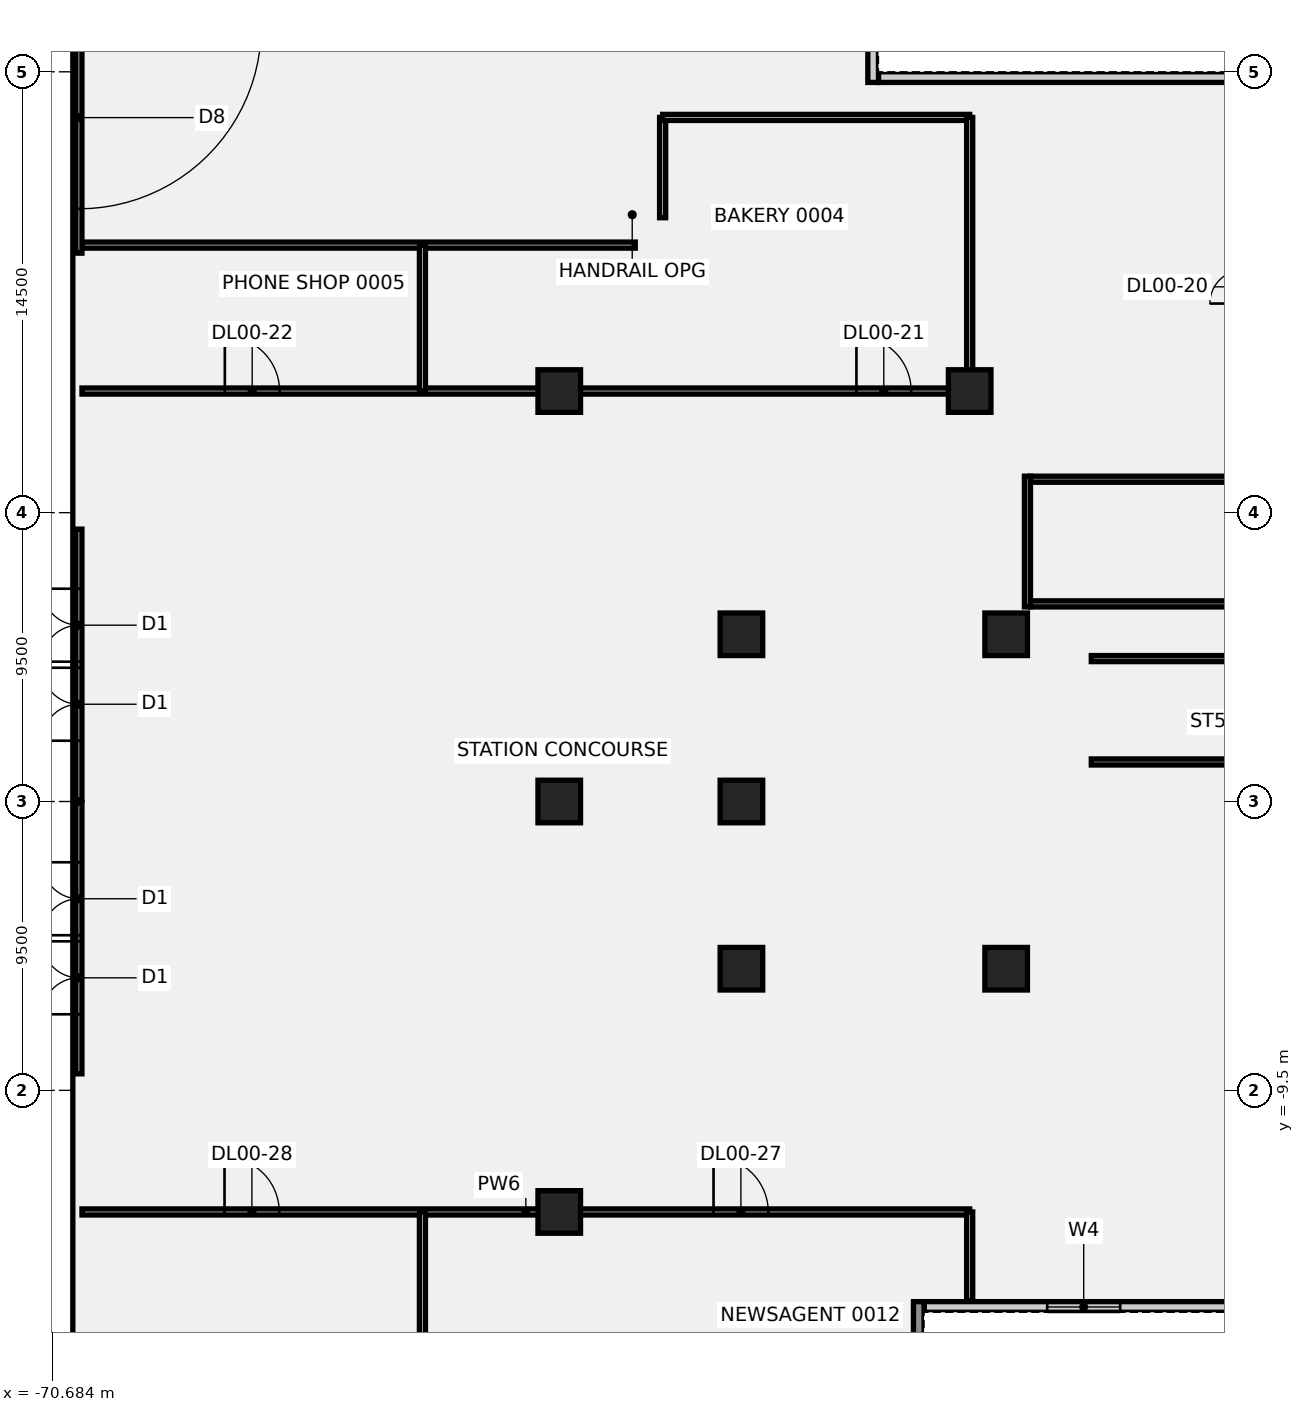
"""IFC4 building model, lengths in metres.
Left out: names, types, materials, properties, quantities, classifications, styles, units other than length and angle.
Written with IfcOpenShell. Run it as: python <this file> out.ifc"""

import sys

from ifc_helpers import new_model, si_unit, direction, frame, frame_2d, origin, origin_2d, place, context, subcontext, project, spatial, polyline, rectangle, outline, extrude, element, fill, save


model = new_model("IFC4")
c1 = context("Model", 3, precision=1e-05, world=origin(), true_north=direction((0.0, 1.0)))
c2 = subcontext(c1, "Body", "Model", "MODEL_VIEW")
j1 = project(units=[si_unit("LENGTHUNIT", "METRE"), si_unit("PLANEANGLEUNIT", "RADIAN")], contexts=[c1])
p1 = place(None, origin())
s1 = spatial("IfcSite", under=j1, at=p1, CompositionType="ELEMENT")
p2 = place(p1, origin())
s2 = spatial("IfcBuilding", under=s1, at=p2, CompositionType="ELEMENT")
p3 = place(p2, origin())
s3 = spatial("IfcBuildingStorey", under=s2, at=p3, CompositionType="ELEMENT", Elevation=0.0)
for number, where, z_axis, x_axis in (
    (1, (-39.3, -5.5, -0.55), (0.0, 0.0, 1.0), (1.0, 0.0, 0.0)),
    (2, (-39.3, 5.5, -0.55), (0.0, 0.0, 1.0), (1.0, 0.0, 0.0)),
    (3, (-48.008, 5.5, -0.55), (0.0, 0.0, 1.0), (1.0, 0.0, 0.0)),
    (4, (-48.008, 0.0, -0.55), (0.0, 0.0, 1.0), (1.0, 0.0, 0.0)),
    (5, (-48.008, -5.5, -0.55), (0.0, 0.0, 1.0), (1.0, 0.0, 0.0)),
    (6, (-54.0, -13.5, -0.55), (0.0, 0.0, 1.0), (1.0, 0.0, 0.0)),
    (7, (-54.0, 0.0, -0.55), (0.0, 0.0, 1.0), (1.0, 0.0, 0.0)),
    (8, (-54.0, 13.5, -0.55), (0.0, 0.0, 1.0), (1.0, 0.0, 0.0)),
    (9, (-40.5, 13.5, -0.55), (0.0, 0.0, 1.0), (1.0, 0.0, 0.0)),
):
    element("IfcColumn", number, at=place(p3, frame(where, z_axis=z_axis, x_axis=x_axis)), inside=s3, PredefinedType="COLUMN", context=c2, shape_type="SweptSolid", body=[
        extrude(rectangle(XDim=1.4, YDim=1.4, at=origin_2d()), origin(), (0.0, 0.0, 1.0), 9.05),
    ])
p4 = place(p3, frame((-69.699, -13.5, 0.0), z_axis=(0.0, 0.0, 1.0), x_axis=(1.0, 0.0, 0.0)))
e10 = element("IfcWall", 10, at=p4, inside=s3, PredefinedType="PARTITIONING", context=c2, shape_type="SweptSolid", body=[
    extrude(rectangle(XDim=29.199, YDim=0.2, at=frame_2d((14.6, 0.0))), origin(), (0.0, 0.0, 1.0), 8.5),
])
p5 = place(p4, frame((20.774, 0.0, 0.0)))
e11 = element("IfcOpeningElement", 11, at=p5, cuts=e10, PredefinedType="OPENING", context=c2, shape_type="SweptSolid", body=[
    extrude(rectangle(XDim=1.8, YDim=2.1, at=frame_2d((0.9, 1.05))), frame((0.0, 0.11, 0.0), z_axis=(0.0, -1.0, 0.0), x_axis=(1.0, 0.0, 0.0)), (0.0, 0.0, 1.0), 0.22),
])
p6 = place(p4, frame((4.689, 0.0, 0.0)))
e12 = element("IfcOpeningElement", 12, at=p6, cuts=e10, PredefinedType="OPENING", context=c2, shape_type="SweptSolid", body=[
    extrude(rectangle(XDim=1.8, YDim=2.1, at=frame_2d((0.9, 1.05))), frame((0.0, 0.11, 0.0), z_axis=(0.0, -1.0, 0.0), x_axis=(1.0, 0.0, 0.0)), (0.0, 0.0, 1.0), 0.22),
])
p7 = place(p3, frame((-69.699, 13.5, 0.0), z_axis=(0.0, 0.0, 1.0), x_axis=(1.0, 0.0, 0.0)))
e13 = element("IfcWall", 13, at=p7, inside=s3, PredefinedType="PARTITIONING", context=c2, shape_type="SweptSolid", body=[
    extrude(rectangle(XDim=29.199, YDim=0.2, at=frame_2d((14.6, 0.0))), origin(), (0.0, 0.0, 1.0), 8.5),
])
p8 = place(p7, frame((25.474, 0.0, 0.0)))
e14 = element("IfcOpeningElement", 14, at=p8, cuts=e13, PredefinedType="OPENING", context=c2, shape_type="SweptSolid", body=[
    extrude(rectangle(XDim=1.8, YDim=2.1, at=frame_2d((0.9, 1.05))), frame((0.0, 0.11, 0.0), z_axis=(0.0, -1.0, 0.0), x_axis=(1.0, 0.0, 0.0)), (0.0, 0.0, 1.0), 0.22),
])
p9 = place(p7, frame((4.699, 0.0, 0.0)))
e15 = element("IfcOpeningElement", 15, at=p9, cuts=e13, PredefinedType="OPENING", context=c2, shape_type="SweptSolid", body=[
    extrude(rectangle(XDim=1.8, YDim=2.1, at=frame_2d((0.9, 1.05))), frame((0.0, 0.11, 0.0), z_axis=(0.0, -1.0, 0.0), x_axis=(1.0, 0.0, 0.0)), (0.0, 0.0, 1.0), 0.22),
])
p10 = place(p3, frame((-69.699, 18.3, 0.0), z_axis=(0.0, 0.0, 1.0), x_axis=(1.0, 0.0, 0.0)))
e16 = element("IfcWall", 16, at=p10, inside=s3, PredefinedType="PARTITIONING", context=c2, shape_type="SweptSolid", body=[
    extrude(rectangle(XDim=18.199, YDim=0.2, at=frame_2d((9.1, 0.0))), origin(), (0.0, 0.0, 1.0), 8.5),
])
p11 = place(p3, frame((-58.5, -18.82, 0.0), z_axis=(0.0, 0.0, 1.0), x_axis=(0.0, 1.0, 0.0)))
e17 = element("IfcWall", 17, at=p11, inside=s3, PredefinedType="PARTITIONING", context=c2, shape_type="SweptSolid", body=[
    extrude(rectangle(XDim=5.32, YDim=0.2, at=frame_2d((2.66, 0.0))), origin(), (0.0, 0.0, 1.0), 8.5),
])
p12 = place(p3, frame((-40.5, -16.42, 0.0), z_axis=(0.0, 0.0, 1.0), x_axis=(0.0, 1.0, 0.0)))
e18 = element("IfcWall", 18, at=p12, inside=s3, PredefinedType="PARTITIONING", context=c2, shape_type="SweptSolid", body=[
    extrude(rectangle(XDim=2.92, YDim=0.2, at=frame_2d((1.46, 0.0))), origin(), (0.0, 0.0, 1.0), 8.5),
])
p13 = place(p3, frame((-50.6, 19.2, 0.0), z_axis=(0.0, 0.0, 1.0), x_axis=(0.0, 1.0, 0.0)))
e19 = element("IfcWall", 19, at=p13, inside=s3, PredefinedType="PARTITIONING", context=c2, shape_type="SweptSolid", body=[
    extrude(rectangle(XDim=3.3, YDim=0.2, at=frame_2d((1.65, 0.0))), origin(), (0.0, 0.0, 1.0), 8.5),
])
p14 = place(p3, frame((-50.6, 22.5, 0.0), z_axis=(0.0, 0.0, 1.0), x_axis=(1.0, 0.0, 0.0)))
e20 = element("IfcWall", 20, at=p14, inside=s3, PredefinedType="PARTITIONING", context=c2, shape_type="SweptSolid", body=[
    extrude(rectangle(XDim=10.1, YDim=0.2, at=frame_2d((5.05, 0.0))), origin(), (0.0, 0.0, 1.0), 8.5),
])
p15 = place(p3, frame((-40.5, 13.5, 0.0), z_axis=(0.0, 0.0, 1.0), x_axis=(0.0, 1.0, 0.0)))
e21 = element("IfcWall", 21, at=p15, inside=s3, PredefinedType="PARTITIONING", context=c2, shape_type="SweptSolid", body=[
    extrude(rectangle(XDim=9.0, YDim=0.2, at=frame_2d((4.5, 0.0))), origin(), (0.0, 0.0, 1.0), 8.5),
])
p16 = place(p3, frame((-58.5, 13.5, 0.0), z_axis=(0.0, 0.0, 1.0), x_axis=(0.0, 1.0, 0.0)))
e22 = element("IfcWall", 22, at=p16, inside=s3, PredefinedType="PARTITIONING", context=c2, shape_type="SweptSolid", body=[
    extrude(rectangle(XDim=4.8, YDim=0.2, at=frame_2d((2.4, 0.0))), origin(), (0.0, 0.0, 1.0), 8.5),
])
for number, where, z_axis, x_axis in (
    (23, (-28.8, 10.6, 0.0), (0.0, 0.0, 1.0), (-1.0, 0.0, 0.0)),
    (24, (-28.8, 6.5, 0.0), (0.0, 0.0, 1.0), (-1.0, 0.0, 0.0)),
):
    element("IfcWall", number, at=place(p3, frame(where, z_axis=z_axis, x_axis=x_axis)), inside=s3, PredefinedType="SOLIDWALL", context=c2, shape_type="SweptSolid", body=[
        extrude(rectangle(XDim=9.7, YDim=0.2, at=frame_2d((4.85, 0.0))), origin(), (0.0, 0.0, 1.0), 8.5),
    ])
p17 = place(p3, frame((-38.6, 10.7, 0.0), z_axis=(0.0, 0.0, 1.0), x_axis=(0.0, -1.0, 0.0)))
e25 = element("IfcWall", 25, at=p17, inside=s3, PredefinedType="SOLIDWALL", context=c2, shape_type="SweptSolid", body=[
    extrude(rectangle(XDim=4.3, YDim=0.2, at=frame_2d((2.15, 0.0))), origin(), (0.0, 0.0, 1.0), 8.5),
])
p18 = place(p3, frame((-69.8, 26.952, 0.0), z_axis=(0.0, 0.0, 1.0), x_axis=(0.0, -1.0, 0.0)))
e26 = element("IfcWall", 26, at=p18, inside=s3, PredefinedType="SOLIDWALL", context=c2, shape_type="SweptSolid", body=[
    extrude(rectangle(XDim=8.917, YDim=0.2, at=frame_2d((4.459, 0.0))), origin(), (0.0, 0.0, 1.0), 4.9),
])
p19 = place(p18, frame((1.459, 0.0, 0.0)))
e27 = element("IfcOpeningElement", 27, at=p19, cuts=e26, PredefinedType="OPENING", context=c2, shape_type="SweptSolid", body=[
    extrude(rectangle(XDim=6.0, YDim=4.5, at=frame_2d((3.0, 2.25))), frame((0.0, 0.11, 0.0), z_axis=(0.0, -1.0, 0.0), x_axis=(1.0, 0.0, 0.0)), (0.0, 0.0, 1.0), 0.22),
])
p20 = place(p3, frame((-69.8, 8.957, 0.0), z_axis=(0.0, 0.0, 1.0), x_axis=(0.0, -1.0, 0.0)))
e28 = element("IfcWall", 28, at=p20, inside=s3, PredefinedType="SOLIDWALL", context=c2, shape_type="SweptSolid", body=[
    extrude(rectangle(XDim=8.917, YDim=0.2, at=frame_2d((4.458, 0.0))), origin(), (0.0, 0.0, 1.0), 2.9),
])
p21 = place(p20, frame((1.959, 0.0, 0.0)))
e29 = element("IfcOpeningElement", 29, at=p21, cuts=e28, PredefinedType="OPENING", context=c2, shape_type="SweptSolid", body=[
    extrude(rectangle(XDim=2.4, YDim=2.4, at=frame_2d((1.2, 1.2))), frame((0.0, 0.11, 0.0), z_axis=(0.0, -1.0, 0.0), x_axis=(1.0, 0.0, 0.0)), (0.0, 0.0, 1.0), 0.22),
])
p22 = place(p20, frame((4.559, 0.0, 0.0)))
e30 = element("IfcOpeningElement", 30, at=p22, cuts=e28, PredefinedType="OPENING", context=c2, shape_type="SweptSolid", body=[
    extrude(rectangle(XDim=2.4, YDim=2.4, at=frame_2d((1.2, 1.2))), frame((0.0, 0.11, 0.0), z_axis=(0.0, -1.0, 0.0), x_axis=(1.0, 0.0, 0.0)), (0.0, 0.0, 1.0), 0.22),
])
p23 = place(p3, frame((-69.8, -0.04, 0.0), z_axis=(0.0, 0.0, 1.0), x_axis=(0.0, -1.0, 0.0)))
e31 = element("IfcWall", 31, at=p23, inside=s3, PredefinedType="SOLIDWALL", context=c2, shape_type="SweptSolid", body=[
    extrude(rectangle(XDim=8.917, YDim=0.2, at=frame_2d((4.458, 0.0))), origin(), (0.0, 0.0, 1.0), 2.9),
])
p24 = place(p23, frame((1.959, 0.0, 0.0)))
e32 = element("IfcOpeningElement", 32, at=p24, cuts=e31, PredefinedType="OPENING", context=c2, shape_type="SweptSolid", body=[
    extrude(rectangle(XDim=2.4, YDim=2.4, at=frame_2d((1.2, 1.2))), frame((0.0, 0.11, 0.0), z_axis=(0.0, -1.0, 0.0), x_axis=(1.0, 0.0, 0.0)), (0.0, 0.0, 1.0), 0.22),
])
p25 = place(p23, frame((4.559, 0.0, 0.0)))
e33 = element("IfcOpeningElement", 33, at=p25, cuts=e31, PredefinedType="OPENING", context=c2, shape_type="SweptSolid", body=[
    extrude(rectangle(XDim=2.4, YDim=2.4, at=frame_2d((1.2, 1.2))), frame((0.0, 0.11, 0.0), z_axis=(0.0, -1.0, 0.0), x_axis=(1.0, 0.0, 0.0)), (0.0, 0.0, 1.0), 0.22),
])
p26 = place(p3, frame((-43.5, 23.825, 0.0), z_axis=(0.0, 0.0, 1.0), x_axis=(1.0, 0.0, 0.0)))
e34 = element("IfcWall", 34, at=p26, inside=s3, PredefinedType="SOLIDWALL", context=c2, shape_type="SweptSolid", body=[
    extrude(rectangle(XDim=26.7, YDim=0.35, at=frame_2d((13.35, 0.0))), origin(), (0.0, 0.0, 1.0), 8.5),
])
p27 = place(p26, frame((14.55, 0.0, 1.0)))
e35 = element("IfcOpeningElement", 35, at=p27, cuts=e34, PredefinedType="OPENING", context=c2, shape_type="SweptSolid", body=[
    extrude(rectangle(XDim=2.4, YDim=1.8, at=frame_2d((1.2, 0.9))), frame((0.0, 0.185, 0.0), z_axis=(0.0, -1.0, 0.0), x_axis=(1.0, 0.0, 0.0)), (0.0, 0.0, 1.0), 0.37),
])
p28 = place(p3, frame((-43.675, 23.65, 0.0), z_axis=(0.0, 0.0, 1.0), x_axis=(0.0, 1.0, 0.0)))
e36 = element("IfcWall", 36, at=p28, inside=s3, PredefinedType="SOLIDWALL", context=c2, shape_type="SweptSolid", body=[
    extrude(rectangle(XDim=18.7, YDim=0.35, at=frame_2d((9.35, 0.0))), origin(), (0.0, 0.0, 1.0), 8.5),
])
p29 = place(p28, frame((14.9, 0.0, 1.0)))
e37 = element("IfcOpeningElement", 37, at=p29, cuts=e36, PredefinedType="OPENING", context=c2, shape_type="SweptSolid", body=[
    extrude(rectangle(XDim=2.4, YDim=1.8, at=frame_2d((1.2, 0.9))), frame((0.0, 0.185, 0.0), z_axis=(0.0, -1.0, 0.0), x_axis=(1.0, 0.0, 0.0)), (0.0, 0.0, 1.0), 0.37),
])
p30 = place(p3, frame((-42.0, -16.625, 0.0), z_axis=(0.0, 0.0, 1.0), x_axis=(1.0, 0.0, 0.0)))
e38 = element("IfcWall", 38, at=p30, inside=s3, PredefinedType="SOLIDWALL", context=c2, shape_type="SweptSolid", body=[
    extrude(rectangle(XDim=18.0, YDim=0.35, at=frame_2d((9.0, 0.0))), origin(), (0.0, 0.0, 1.0), 8.5),
])
p31 = place(p30, frame((13.0, 0.0, 0.0)))
e39 = element("IfcOpeningElement", 39, at=p31, cuts=e38, PredefinedType="OPENING", context=c2, shape_type="SweptSolid", body=[
    extrude(rectangle(XDim=1.8, YDim=2.4, at=frame_2d((0.9, 1.2))), frame((0.0, 0.185, 0.0), z_axis=(0.0, -1.0, 0.0), x_axis=(1.0, 0.0, 0.0)), (0.0, 0.0, 1.0), 0.37),
])
p32 = place(p30, frame((15.5, 0.0, 0.0)))
e40 = element("IfcOpeningElement", 40, at=p32, cuts=e38, PredefinedType="OPENING", context=c2, shape_type="SweptSolid", body=[
    extrude(rectangle(XDim=1.8, YDim=2.4, at=frame_2d((0.9, 1.2))), frame((0.0, 0.185, 0.0), z_axis=(0.0, -1.0, 0.0), x_axis=(1.0, 0.0, 0.0)), (0.0, 0.0, 1.0), 0.37),
])
p33 = place(p30, frame((4.05, 0.0, 1.0)))
e41 = element("IfcOpeningElement", 41, at=p33, cuts=e38, PredefinedType="OPENING", context=c2, shape_type="SweptSolid", body=[
    extrude(rectangle(XDim=2.4, YDim=1.8, at=frame_2d((1.2, 0.9))), frame((0.0, 0.185, 0.0), z_axis=(0.0, -1.0, 0.0), x_axis=(1.0, 0.0, 0.0)), (0.0, 0.0, 1.0), 0.37),
])
p34 = place(p3, frame((-42.175, -35.4, 0.0), z_axis=(0.0, 0.0, 1.0), x_axis=(0.0, 1.0, 0.0)))
e42 = element("IfcWall", 42, at=p34, inside=s3, PredefinedType="SOLIDWALL", context=c2, shape_type="SweptSolid", body=[
    extrude(rectangle(XDim=18.95, YDim=0.35, at=frame_2d((9.475, 0.0))), origin(), (0.0, 0.0, 1.0), 8.5),
])
p35 = place(p34, frame((9.9, 0.0, 0.0)))
e43 = element("IfcOpeningElement", 43, at=p35, cuts=e42, PredefinedType="OPENING", context=c2, shape_type="SweptSolid", body=[
    extrude(rectangle(XDim=1.8, YDim=2.4, at=frame_2d((0.9, 1.2))), frame((0.0, 0.185, 0.0), z_axis=(0.0, -1.0, 0.0), x_axis=(1.0, 0.0, 0.0)), (0.0, 0.0, 1.0), 0.37),
])
p36 = place(p34, frame((6.45, 0.0, 1.0)))
e44 = element("IfcOpeningElement", 44, at=p36, cuts=e42, PredefinedType="OPENING", context=c2, shape_type="SweptSolid", body=[
    extrude(rectangle(XDim=2.4, YDim=1.8, at=frame_2d((1.2, 0.9))), frame((0.0, 0.185, 0.0), z_axis=(0.0, -1.0, 0.0), x_axis=(1.0, 0.0, 0.0)), (0.0, 0.0, 1.0), 0.37),
])
p37 = place(p3, frame((-29.8, 1.3, 0.0), z_axis=(0.0, 0.0, 1.0), x_axis=(-1.0, 0.0, 0.0)))
e45 = element("IfcWall", 45, at=p37, inside=s3, PredefinedType="SHEAR", context=c2, shape_type="SweptSolid", body=[
    extrude(rectangle(XDim=6.7, YDim=0.2, at=frame_2d((3.35, 0.0))), origin(), (0.0, 0.0, 1.0), 8.5),
])
p38 = place(p37, frame((0.35, 0.0, 0.0)))
e46 = element("IfcOpeningElement", 46, at=p38, cuts=e45, PredefinedType="OPENING", context=c2, shape_type="SweptSolid", body=[
    extrude(rectangle(XDim=1.2, YDim=2.1, at=frame_2d((0.6, 1.05))), frame((0.0, 0.11, 0.0), z_axis=(0.0, -1.0, 0.0), x_axis=(1.0, 0.0, 0.0)), (0.0, 0.0, 1.0), 0.22),
])
p39 = place(p3, frame((-29.8, 4.7, 0.0), z_axis=(0.0, 0.0, 1.0), x_axis=(-1.0, 0.0, 0.0)))
e47 = element("IfcWall", 47, at=p39, inside=s3, PredefinedType="SHEAR", context=c2, shape_type="SweptSolid", body=[
    extrude(rectangle(XDim=6.7, YDim=0.2, at=frame_2d((3.35, 0.0))), origin(), (0.0, 0.0, 1.0), 8.5),
])
p40 = place(p3, origin())
e48 = element("IfcWall", 48, at=p40, inside=s3, PredefinedType="SHEAR", context=c2, shape_type="SweptSolid", body=[
    extrude(outline(polyline([(-36.3, 4.6), (-36.5, 4.6), (-36.5, 1.4), (-36.3, 1.4), (-36.3, 4.6)])), origin(), (0.0, 0.0, 1.0), 8.5),
])
p41 = place(p8, origin())
e49 = element("IfcDoor", 49, at=p41, inside=s3, OperationType="SINGLE_SWING_LEFT", PredefinedType="DOOR", context=c2, shape_type="SweptSolid", body=[
    extrude(rectangle(XDim=1.8, YDim=2.1, at=frame_2d((0.9, 1.05))), frame((0.0, 0.025, 0.0), z_axis=(0.0, -1.0, 0.0), x_axis=(1.0, 0.0, 0.0)), (0.0, 0.0, 1.0), 0.05),
])
fill(e14, e49)
p42 = place(p9, origin())
e50 = element("IfcDoor", 50, at=p42, inside=s3, OperationType="SINGLE_SWING_RIGHT", PredefinedType="DOOR", context=c2, shape_type="SweptSolid", body=[
    extrude(rectangle(XDim=1.8, YDim=2.1, at=frame_2d((0.9, 1.05))), frame((0.0, 0.025, 0.0), z_axis=(0.0, -1.0, 0.0), x_axis=(1.0, 0.0, 0.0)), (0.0, 0.0, 1.0), 0.05),
])
fill(e15, e50)
p43 = place(p5, origin())
e51 = element("IfcDoor", 51, at=p43, inside=s3, OperationType="SINGLE_SWING_LEFT", PredefinedType="DOOR", context=c2, shape_type="SweptSolid", body=[
    extrude(rectangle(XDim=1.8, YDim=2.1, at=frame_2d((0.9, 1.05))), frame((0.0, 0.025, 0.0), z_axis=(0.0, -1.0, 0.0), x_axis=(1.0, 0.0, 0.0)), (0.0, 0.0, 1.0), 0.05),
])
fill(e11, e51)
p44 = place(p6, origin())
e52 = element("IfcDoor", 52, at=p44, inside=s3, OperationType="SINGLE_SWING_RIGHT", PredefinedType="DOOR", context=c2, shape_type="SweptSolid", body=[
    extrude(rectangle(XDim=1.8, YDim=2.1, at=frame_2d((0.9, 1.05))), frame((0.0, 0.025, 0.0), z_axis=(0.0, -1.0, 0.0), x_axis=(1.0, 0.0, 0.0)), (0.0, 0.0, 1.0), 0.05),
])
fill(e12, e52)
p45 = place(p19, origin())
e53 = element("IfcDoor", 53, at=p45, inside=s3, OperationType="SINGLE_SWING_LEFT", PredefinedType="DOOR", context=c2, shape_type="SweptSolid", body=[
    extrude(rectangle(XDim=6.0, YDim=4.5, at=frame_2d((3.0, 2.25))), frame((0.0, 0.025, 0.0), z_axis=(0.0, -1.0, 0.0), x_axis=(1.0, 0.0, 0.0)), (0.0, 0.0, 1.0), 0.05),
])
fill(e27, e53)
p46 = place(p21, frame((2.4, 0.0, 0.0), z_axis=(0.0, 0.0, 1.0), x_axis=(-1.0, 0.0, 0.0)))
e54 = element("IfcDoor", 54, at=p46, inside=s3, OperationType="DOUBLE_DOOR_DOUBLE_SWING", PredefinedType="DOOR", context=c2, shape_type="SweptSolid", body=[
    extrude(rectangle(XDim=2.4, YDim=2.4, at=frame_2d((1.2, 1.2))), frame((0.0, 0.025, 0.0), z_axis=(0.0, -1.0, 0.0), x_axis=(1.0, 0.0, 0.0)), (0.0, 0.0, 1.0), 0.05),
])
fill(e29, e54)
p47 = place(p22, frame((2.4, 0.0, 0.0), z_axis=(0.0, 0.0, 1.0), x_axis=(-1.0, 0.0, 0.0)))
e55 = element("IfcDoor", 55, at=p47, inside=s3, OperationType="DOUBLE_DOOR_DOUBLE_SWING", PredefinedType="DOOR", context=c2, shape_type="SweptSolid", body=[
    extrude(rectangle(XDim=2.4, YDim=2.4, at=frame_2d((1.2, 1.2))), frame((0.0, 0.025, 0.0), z_axis=(0.0, -1.0, 0.0), x_axis=(1.0, 0.0, 0.0)), (0.0, 0.0, 1.0), 0.05),
])
fill(e30, e55)
p48 = place(p24, frame((2.4, 0.0, 0.0), z_axis=(0.0, 0.0, 1.0), x_axis=(-1.0, 0.0, 0.0)))
e56 = element("IfcDoor", 56, at=p48, inside=s3, OperationType="DOUBLE_DOOR_DOUBLE_SWING", PredefinedType="DOOR", context=c2, shape_type="SweptSolid", body=[
    extrude(rectangle(XDim=2.4, YDim=2.4, at=frame_2d((1.2, 1.2))), frame((0.0, 0.025, 0.0), z_axis=(0.0, -1.0, 0.0), x_axis=(1.0, 0.0, 0.0)), (0.0, 0.0, 1.0), 0.05),
])
fill(e32, e56)
p49 = place(p25, frame((2.4, 0.0, 0.0), z_axis=(0.0, 0.0, 1.0), x_axis=(-1.0, 0.0, 0.0)))
e57 = element("IfcDoor", 57, at=p49, inside=s3, OperationType="DOUBLE_DOOR_DOUBLE_SWING", PredefinedType="DOOR", context=c2, shape_type="SweptSolid", body=[
    extrude(rectangle(XDim=2.4, YDim=2.4, at=frame_2d((1.2, 1.2))), frame((0.0, 0.025, 0.0), z_axis=(0.0, -1.0, 0.0), x_axis=(1.0, 0.0, 0.0)), (0.0, 0.0, 1.0), 0.05),
])
fill(e33, e57)
p50 = place(p33, origin())
e58 = element("IfcWindow", 58, at=p50, inside=s3, PartitioningType="SINGLE_PANEL", PredefinedType="WINDOW", context=c2, shape_type="SweptSolid", body=[
    extrude(rectangle(XDim=2.4, YDim=1.8, at=frame_2d((1.2, 0.9))), frame((0.0, 0.03, 0.0), z_axis=(0.0, -1.0, 0.0), x_axis=(1.0, 0.0, 0.0)), (0.0, 0.0, 1.0), 0.06),
])
fill(e41, e58)
save(model, sys.argv[1])
